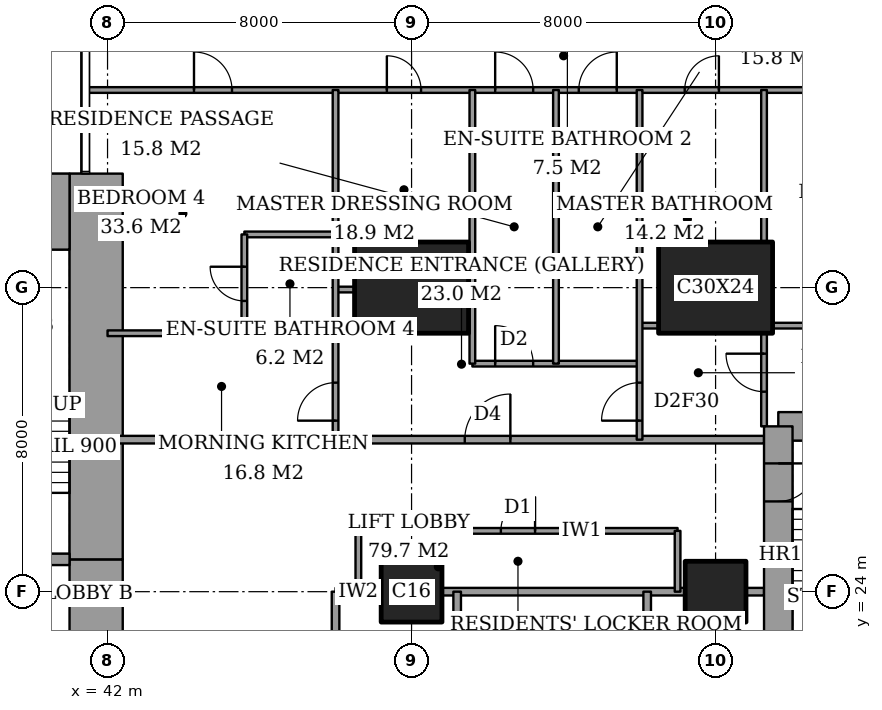
"""IFC4 building model, lengths in metres.
Left out: names, types, materials, properties, quantities, classifications, styles, units other than length and angle.
Written with IfcOpenShell. Run it as: python <this file> out.ifc"""

import sys

from ifc_helpers import new_model, si_unit, direction, frame, frame_2d, origin, origin_2d, place, context, subcontext, project, spatial, rectangle, extrude, element, fill, save


model = new_model("IFC4")
c1 = context("Model", 3, precision=1e-05, world=origin(), true_north=direction((0.0, 1.0)))
c2 = subcontext(c1, "Body", "Model", "MODEL_VIEW")
j1 = project(units=[si_unit("LENGTHUNIT", "METRE"), si_unit("PLANEANGLEUNIT", "RADIAN")], contexts=[c1])
p1 = place(None, origin())
s1 = spatial("IfcSite", under=j1, at=p1, CompositionType="ELEMENT")
p2 = place(p1, origin())
s2 = spatial("IfcBuilding", under=s1, at=p2, CompositionType="ELEMENT")
p3 = place(p2, frame((0.0, 0.0, 262.8)))
s3 = spatial("IfcBuildingStorey", under=s2, at=p3, CompositionType="ELEMENT", Elevation=262.8)
p4 = place(p3, frame((50.0, 24.0, 0.0), z_axis=(0.0, 0.0, 1.0), x_axis=(1.0, 0.0, 0.0)))
e1 = element("IfcColumn", 1, at=p4, inside=s3, PredefinedType="COLUMN", context=c2, shape_type="SweptSolid", body=[
    extrude(rectangle(XDim=1.6, YDim=1.6, at=origin_2d()), origin(), (0.0, 0.0, 1.0), 3.6),
])
p5 = place(p3, frame((50.0, 32.0, 0.0), z_axis=(0.0, 0.0, 1.0), x_axis=(1.0, 0.0, 0.0)))
e2 = element("IfcColumn", 2, at=p5, inside=s3, PredefinedType="COLUMN", context=c2, shape_type="SweptSolid", body=[
    extrude(rectangle(XDim=3.0, YDim=2.4, at=origin_2d()), origin(), (0.0, 0.0, 1.0), 3.6),
])
p6 = place(p3, frame((58.0, 24.0, 0.0), z_axis=(0.0, 0.0, 1.0), x_axis=(1.0, 0.0, 0.0)))
e3 = element("IfcColumn", 3, at=p6, inside=s3, PredefinedType="COLUMN", context=c2, shape_type="SweptSolid", body=[
    extrude(rectangle(XDim=1.6, YDim=1.6, at=origin_2d()), origin(), (0.0, 0.0, 1.0), 3.6),
])
p7 = place(p3, frame((58.0, 32.0, 0.0), z_axis=(0.0, 0.0, 1.0), x_axis=(1.0, 0.0, 0.0)))
e4 = element("IfcColumn", 4, at=p7, inside=s3, PredefinedType="COLUMN", context=c2, shape_type="SweptSolid", body=[
    extrude(rectangle(XDim=3.0, YDim=2.4, at=origin_2d()), origin(), (0.0, 0.0, 1.0), 3.6),
])
p8 = place(p3, frame((37.85, 34.0, 0.0), z_axis=(0.0, 0.0, 1.0), x_axis=(1.0, 0.0, 0.0)))
e5 = element("IfcWall", 5, at=p8, inside=s3, PredefinedType="SHEAR", context=c2, shape_type="SweptSolid", body=[
    extrude(rectangle(XDim=3.15, YDim=2.0, at=frame_2d((1.575, 0.0))), origin(), (0.0, 0.0, 1.0), 3.6),
])
p9 = place(p3, frame((41.7, 13.0, 0.0), z_axis=(0.0, 0.0, 1.0), x_axis=(0.0, 1.0, 0.0)))
e6 = element("IfcWall", 6, at=p9, inside=s3, PredefinedType="SHEAR", context=c2, shape_type="SweptSolid", body=[
    extrude(rectangle(XDim=11.85, YDim=1.4, at=frame_2d((5.925, 0.0))), origin(), (0.0, 0.0, 1.0), 3.6),
])
p10 = place(p9, frame((7.5, 0.0, 0.0)))
e7 = element("IfcOpeningElement", 7, at=p10, cuts=e6, PredefinedType="OPENING", context=c2, shape_type="SweptSolid", body=[
    extrude(rectangle(XDim=1.8, YDim=2.4, at=frame_2d((0.9, 1.2))), frame((0.0, 0.71, 0.0), z_axis=(0.0, -1.0, 0.0), x_axis=(1.0, 0.0, 0.0)), (0.0, 0.0, 1.0), 1.42),
])
p11 = place(p3, frame((41.7, 24.85, 0.0), z_axis=(0.0, 0.0, 1.0), x_axis=(0.0, 1.0, 0.0)))
e8 = element("IfcWall", 8, at=p11, inside=s3, PredefinedType="SHEAR", context=c2, shape_type="SweptSolid", body=[
    extrude(rectangle(XDim=10.15, YDim=1.4, at=frame_2d((5.075, 0.0))), origin(), (0.0, 0.0, 1.0), 3.6),
])
p12 = place(p3, frame((37.85, 24.85, 0.0), z_axis=(0.0, 0.0, 1.0), x_axis=(1.0, 0.0, 0.0)))
e9 = element("IfcWall", 9, at=p12, inside=s3, PredefinedType="SHEAR", context=c2, shape_type="SweptSolid", body=[
    extrude(rectangle(XDim=3.15, YDim=0.3, at=frame_2d((1.575, 0.0))), origin(), (0.0, 0.0, 1.0), 3.6),
])
p13 = place(p12, frame((0.95, 0.0, 0.0)))
e10 = element("IfcOpeningElement", 10, at=p13, cuts=e9, PredefinedType="OPENING", context=c2, shape_type="SweptSolid", body=[
    extrude(rectangle(XDim=1.0, YDim=2.1, at=frame_2d((0.5, 1.05))), frame((0.0, 0.16, 0.0), z_axis=(0.0, -1.0, 0.0), x_axis=(1.0, 0.0, 0.0)), (0.0, 0.0, 1.0), 0.32),
])
p14 = place(p3, frame((64.1, 28.35, 0.0), z_axis=(0.0, 0.0, 1.0), x_axis=(-1.0, 0.0, 0.0)))
e11 = element("IfcWall", 11, at=p14, inside=s3, PredefinedType="SHEAR", context=c2, shape_type="SweptSolid", body=[
    extrude(rectangle(XDim=4.45, YDim=0.75, at=frame_2d((2.225, 0.0))), origin(), (0.0, 0.0, 1.0), 3.6),
])
p15 = place(p3, frame((59.65, 28.35, 0.0), z_axis=(0.0, 0.0, 1.0), x_axis=(0.0, -1.0, 0.0)))
e12 = element("IfcWall", 12, at=p15, inside=s3, PredefinedType="SHEAR", context=c2, shape_type="SweptSolid", body=[
    extrude(rectangle(XDim=8.7, YDim=0.75, at=frame_2d((4.35, 0.0))), origin(), (0.0, 0.0, 1.0), 3.6),
])
p16 = place(p15, frame((0.975, 0.0, 0.0)))
e13 = element("IfcOpeningElement", 13, at=p16, cuts=e12, PredefinedType="OPENING", context=c2, shape_type="SweptSolid", body=[
    extrude(rectangle(XDim=1.0, YDim=2.1, at=frame_2d((0.5, 1.05))), frame((0.0, 0.385, 0.0), z_axis=(0.0, -1.0, 0.0), x_axis=(1.0, 0.0, 0.0)), (0.0, 0.0, 1.0), 0.77),
])
p17 = place(p3, frame((48.0, 24.0, 0.0), z_axis=(0.0, 0.0, 1.0), x_axis=(1.0, 0.0, 0.0)))
e14 = element("IfcWall", 14, at=p17, inside=s3, PredefinedType="PARTITIONING", context=c2, shape_type="SweptSolid", body=[
    extrude(rectangle(XDim=1.2, YDim=0.2, at=frame_2d((0.6, 0.0))), origin(), (0.0, 0.0, 1.0), 3.35),
])
p18 = place(p3, frame((50.8, 24.0, 0.0), z_axis=(0.0, 0.0, 1.0), x_axis=(1.0, 0.0, 0.0)))
e15 = element("IfcWall", 15, at=p18, inside=s3, PredefinedType="PARTITIONING", context=c2, shape_type="SweptSolid", body=[
    extrude(rectangle(XDim=6.4, YDim=0.2, at=frame_2d((3.2, 0.0))), origin(), (0.0, 0.0, 1.0), 3.35),
])
p19 = place(p3, frame((58.8, 24.0, 0.0), z_axis=(0.0, 0.0, 1.0), x_axis=(1.0, 0.0, 0.0)))
e16 = element("IfcWall", 16, at=p19, inside=s3, PredefinedType="PARTITIONING", context=c2, shape_type="SweptSolid", body=[
    extrude(rectangle(XDim=0.475, YDim=0.2, at=frame_2d((0.237, 0.0))), origin(), (0.0, 0.0, 1.0), 3.35),
])
p20 = place(p3, frame((48.6, 25.6, 0.0), z_axis=(0.0, 0.0, 1.0), x_axis=(1.0, 0.0, 0.0)))
e17 = element("IfcWall", 17, at=p20, inside=s3, PredefinedType="PARTITIONING", context=c2, shape_type="SweptSolid", body=[
    extrude(rectangle(XDim=8.4, YDim=0.15, at=frame_2d((4.2, 0.0))), origin(), (0.0, 0.0, 1.0), 3.35),
])
p21 = place(p20, frame((3.75, 0.0, 0.0)))
e18 = element("IfcOpeningElement", 18, at=p21, cuts=e17, PredefinedType="OPENING", context=c2, shape_type="SweptSolid", body=[
    extrude(rectangle(XDim=0.9, YDim=2.1, at=frame_2d((0.45, 1.05))), frame((0.0, 0.085, 0.0), z_axis=(0.0, -1.0, 0.0), x_axis=(1.0, 0.0, 0.0)), (0.0, 0.0, 1.0), 0.17),
])
p22 = place(p3, frame((42.0, 28.0, 0.0), z_axis=(0.0, 0.0, 1.0), x_axis=(1.0, 0.0, 0.0)))
e19 = element("IfcWall", 19, at=p22, inside=s3, PredefinedType="PARTITIONING", context=c2, shape_type="SweptSolid", body=[
    extrude(rectangle(XDim=17.275, YDim=0.2, at=frame_2d((8.637, 0.0))), origin(), (0.0, 0.0, 1.0), 3.35),
])
p23 = place(p22, frame((9.4, 0.0, 0.0)))
e20 = element("IfcOpeningElement", 20, at=p23, cuts=e19, PredefinedType="OPENING", context=c2, shape_type="SweptSolid", body=[
    extrude(rectangle(XDim=1.2, YDim=2.4, at=frame_2d((0.6, 1.2))), frame((0.0, 0.11, 0.0), z_axis=(0.0, -1.0, 0.0), x_axis=(1.0, 0.0, 0.0)), (0.0, 0.0, 1.0), 0.22),
])
p24 = place(p3, frame((51.6, 30.0, 0.0), z_axis=(0.0, 0.0, 1.0), x_axis=(1.0, 0.0, 0.0)))
e21 = element("IfcWall", 21, at=p24, inside=s3, PredefinedType="PARTITIONING", context=c2, shape_type="SweptSolid", body=[
    extrude(rectangle(XDim=4.4, YDim=0.15, at=frame_2d((2.2, 0.0))), origin(), (0.0, 0.0, 1.0), 3.35),
])
p25 = place(p24, frame((0.6, 0.0, 0.0)))
e22 = element("IfcOpeningElement", 22, at=p25, cuts=e21, PredefinedType="OPENING", context=c2, shape_type="SweptSolid", body=[
    extrude(rectangle(XDim=1.0, YDim=2.1, at=frame_2d((0.5, 1.05))), frame((0.0, 0.085, 0.0), z_axis=(0.0, -1.0, 0.0), x_axis=(1.0, 0.0, 0.0)), (0.0, 0.0, 1.0), 0.17),
])
p26 = place(p3, frame((42.0, 30.8, 0.0), z_axis=(0.0, 0.0, 1.0), x_axis=(1.0, 0.0, 0.0)))
e23 = element("IfcWall", 23, at=p26, inside=s3, PredefinedType="PARTITIONING", context=c2, shape_type="SweptSolid", body=[
    extrude(rectangle(XDim=6.0, YDim=0.15, at=frame_2d((3.0, 0.0))), origin(), (0.0, 0.0, 1.0), 3.35),
])
p27 = place(p3, frame((56.0, 31.0, 0.0), z_axis=(0.0, 0.0, 1.0), x_axis=(1.0, 0.0, 0.0)))
e24 = element("IfcWall", 24, at=p27, inside=s3, PredefinedType="PARTITIONING", context=c2, shape_type="SweptSolid", body=[
    extrude(rectangle(XDim=0.5, YDim=0.15, at=frame_2d((0.25, 0.0))), origin(), (0.0, 0.0, 1.0), 3.35),
])
p28 = place(p3, frame((59.5, 31.0, 0.0), z_axis=(0.0, 0.0, 1.0), x_axis=(1.0, 0.0, 0.0)))
e25 = element("IfcWall", 25, at=p28, inside=s3, PredefinedType="PARTITIONING", context=c2, shape_type="SweptSolid", body=[
    extrude(rectangle(XDim=6.95, YDim=0.15, at=frame_2d((3.475, 0.0))), origin(), (0.0, 0.0, 1.0), 3.35),
])
p29 = place(p3, frame((48.0, 31.95, 0.0), z_axis=(0.0, 0.0, 1.0), x_axis=(1.0, 0.0, 0.0)))
e26 = element("IfcWall", 26, at=p29, inside=s3, PredefinedType="PARTITIONING", context=c2, shape_type="SweptSolid", body=[
    extrude(rectangle(XDim=0.5, YDim=0.15, at=frame_2d((0.25, 0.0))), origin(), (0.0, 0.0, 1.0), 2.634),
])
p30 = place(p3, frame((45.6, 33.4, 0.0), z_axis=(0.0, 0.0, 1.0), x_axis=(1.0, 0.0, 0.0)))
e27 = element("IfcWall", 27, at=p30, inside=s3, PredefinedType="PARTITIONING", context=c2, shape_type="SweptSolid", body=[
    extrude(rectangle(XDim=2.4, YDim=0.15, at=frame_2d((1.2, 0.0))), origin(), (0.0, 0.0, 1.0), 3.35),
])
p31 = place(p3, frame((41.439, 37.2, 0.0), z_axis=(0.0, 0.0, 1.0), x_axis=(1.0, 0.0, 0.0)))
e28 = element("IfcWall", 28, at=p31, inside=s3, PredefinedType="PARTITIONING", context=c2, shape_type="SweptSolid", body=[
    extrude(rectangle(XDim=25.011, YDim=0.15, at=frame_2d((12.505, 0.0))), origin(), (0.0, 0.0, 1.0), 3.35),
])
p32 = place(p31, frame((10.761, 0.0, 0.0)))
e29 = element("IfcOpeningElement", 29, at=p32, cuts=e28, PredefinedType="OPENING", context=c2, shape_type="SweptSolid", body=[
    extrude(rectangle(XDim=1.0, YDim=2.1, at=frame_2d((0.5, 1.05))), frame((0.0, 0.085, 0.0), z_axis=(0.0, -1.0, 0.0), x_axis=(1.0, 0.0, 0.0)), (0.0, 0.0, 1.0), 0.17),
])
p33 = place(p31, frame((20.924, 0.0, 0.0)))
e30 = element("IfcOpeningElement", 30, at=p33, cuts=e28, PredefinedType="OPENING", context=c2, shape_type="SweptSolid", body=[
    extrude(rectangle(XDim=1.0, YDim=2.1, at=frame_2d((0.5, 1.05))), frame((0.0, 0.085, 0.0), z_axis=(0.0, -1.0, 0.0), x_axis=(1.0, 0.0, 0.0)), (0.0, 0.0, 1.0), 0.17),
])
p34 = place(p31, frame((15.749, 0.0, 0.0)))
e31 = element("IfcOpeningElement", 31, at=p34, cuts=e28, PredefinedType="OPENING", context=c2, shape_type="SweptSolid", body=[
    extrude(rectangle(XDim=0.9, YDim=2.1, at=frame_2d((0.45, 1.05))), frame((0.0, 0.085, 0.0), z_axis=(0.0, -1.0, 0.0), x_axis=(1.0, 0.0, 0.0)), (0.0, 0.0, 1.0), 0.17),
])
p35 = place(p31, frame((12.961, 0.0, 0.0)))
e32 = element("IfcOpeningElement", 32, at=p35, cuts=e28, PredefinedType="OPENING", context=c2, shape_type="SweptSolid", body=[
    extrude(rectangle(XDim=1.0, YDim=2.1, at=frame_2d((0.5, 1.05))), frame((0.0, 0.085, 0.0), z_axis=(0.0, -1.0, 0.0), x_axis=(1.0, 0.0, 0.0)), (0.0, 0.0, 1.0), 0.17),
])
p36 = place(p31, frame((7.911, 0.0, 0.0)))
e33 = element("IfcOpeningElement", 33, at=p36, cuts=e28, PredefinedType="OPENING", context=c2, shape_type="SweptSolid", body=[
    extrude(rectangle(XDim=0.9, YDim=2.1, at=frame_2d((0.45, 1.05))), frame((0.0, 0.085, 0.0), z_axis=(0.0, -1.0, 0.0), x_axis=(1.0, 0.0, 0.0)), (0.0, 0.0, 1.0), 0.17),
])
p37 = place(p31, frame((2.836, 0.0, 0.0)))
e34 = element("IfcOpeningElement", 34, at=p37, cuts=e28, PredefinedType="OPENING", context=c2, shape_type="SweptSolid", body=[
    extrude(rectangle(XDim=1.0, YDim=2.1, at=frame_2d((0.5, 1.05))), frame((0.0, 0.085, 0.0), z_axis=(0.0, -1.0, 0.0), x_axis=(1.0, 0.0, 0.0)), (0.0, 0.0, 1.0), 0.17),
])
p38 = place(p3, frame((45.6, 30.8, 0.0), z_axis=(0.0, 0.0, 1.0), x_axis=(0.0, 1.0, 0.0)))
e35 = element("IfcWall", 35, at=p38, inside=s3, PredefinedType="PARTITIONING", context=c2, shape_type="SweptSolid", body=[
    extrude(rectangle(XDim=2.6, YDim=0.15, at=frame_2d((1.3, 0.0))), origin(), (0.0, 0.0, 1.0), 3.35),
])
p39 = place(p38, frame((0.85, 0.0, 0.0)))
e36 = element("IfcOpeningElement", 36, at=p39, cuts=e35, PredefinedType="OPENING", context=c2, shape_type="SweptSolid", body=[
    extrude(rectangle(XDim=0.9, YDim=2.1, at=frame_2d((0.45, 1.05))), frame((0.0, 0.085, 0.0), z_axis=(0.0, -1.0, 0.0), x_axis=(1.0, 0.0, 0.0)), (0.0, 0.0, 1.0), 0.17),
])
p40 = place(p3, frame((48.0, 16.5, 0.0), z_axis=(0.0, 0.0, 1.0), x_axis=(0.0, 1.0, 0.0)))
e37 = element("IfcWall", 37, at=p40, inside=s3, PredefinedType="PARTITIONING", context=c2, shape_type="SweptSolid", body=[
    extrude(rectangle(XDim=7.5, YDim=0.2, at=frame_2d((3.75, 0.0))), origin(), (0.0, 0.0, 1.0), 3.35),
])
p41 = place(p40, frame((4.9, 0.0, 0.0)))
e38 = element("IfcOpeningElement", 38, at=p41, cuts=e37, PredefinedType="OPENING", context=c2, shape_type="SweptSolid", body=[
    extrude(rectangle(XDim=1.2, YDim=2.4, at=frame_2d((0.6, 1.2))), frame((0.0, 0.11, 0.0), z_axis=(0.0, -1.0, 0.0), x_axis=(1.0, 0.0, 0.0)), (0.0, 0.0, 1.0), 0.22),
])
p42 = place(p40, frame((1.3, 0.0, 0.0)))
e39 = element("IfcOpeningElement", 39, at=p42, cuts=e37, PredefinedType="OPENING", context=c2, shape_type="SweptSolid", body=[
    extrude(rectangle(XDim=0.9, YDim=2.1, at=frame_2d((0.45, 1.05))), frame((0.0, 0.11, 0.0), z_axis=(0.0, -1.0, 0.0), x_axis=(1.0, 0.0, 0.0)), (0.0, 0.0, 1.0), 0.22),
])
p43 = place(p3, frame((48.0, 28.0, 0.0), z_axis=(0.0, 0.0, 1.0), x_axis=(0.0, 1.0, 0.0)))
e40 = element("IfcWall", 40, at=p43, inside=s3, PredefinedType="PARTITIONING", context=c2, shape_type="SweptSolid", body=[
    extrude(rectangle(XDim=9.2, YDim=0.15, at=frame_2d((4.6, 0.0))), origin(), (0.0, 0.0, 1.0), 3.35),
])
p44 = place(p43, frame((0.5, 0.0, 0.0)))
e41 = element("IfcOpeningElement", 41, at=p44, cuts=e40, PredefinedType="OPENING", context=c2, shape_type="SweptSolid", body=[
    extrude(rectangle(XDim=1.0, YDim=2.1, at=frame_2d((0.5, 1.05))), frame((0.0, 0.085, 0.0), z_axis=(0.0, -1.0, 0.0), x_axis=(1.0, 0.0, 0.0)), (0.0, 0.0, 1.0), 0.17),
])
p45 = place(p3, frame((48.6, 24.0, 0.0), z_axis=(0.0, 0.0, 1.0), x_axis=(0.0, 1.0, 0.0)))
e42 = element("IfcWall", 42, at=p45, inside=s3, PredefinedType="PARTITIONING", context=c2, shape_type="SweptSolid", body=[
    extrude(rectangle(XDim=1.6, YDim=0.15, at=frame_2d((0.8, 0.0))), origin(), (0.0, 0.0, 1.0), 3.35),
])
p46 = place(p3, frame((51.2, 21.6, 0.0), z_axis=(0.0, 0.0, 1.0), x_axis=(0.0, 1.0, 0.0)))
e43 = element("IfcWall", 43, at=p46, inside=s3, PredefinedType="PARTITIONING", context=c2, shape_type="SweptSolid", body=[
    extrude(rectangle(XDim=2.4, YDim=0.2, at=frame_2d((1.2, 0.0))), origin(), (0.0, 0.0, 1.0), 3.35),
])
for number, where, z_axis, x_axis in (
    (44, (51.6, 30.0, 0.0), (0.0, 0.0, 1.0), (0.0, 1.0, 0.0)),
    (45, (53.8, 30.0, 0.0), (0.0, 0.0, 1.0), (0.0, 1.0, 0.0)),
):
    element("IfcWall", number, at=place(p3, frame(where, z_axis=z_axis, x_axis=x_axis)), inside=s3, PredefinedType="PARTITIONING", context=c2, shape_type="SweptSolid", body=[
        extrude(rectangle(XDim=7.2, YDim=0.15, at=frame_2d((3.6, 0.0))), origin(), (0.0, 0.0, 1.0), 3.35),
    ])
p47 = place(p3, frame((56.0, 28.0, 0.0), z_axis=(0.0, 0.0, 1.0), x_axis=(0.0, 1.0, 0.0)))
e46 = element("IfcWall", 46, at=p47, inside=s3, PredefinedType="PARTITIONING", context=c2, shape_type="SweptSolid", body=[
    extrude(rectangle(XDim=9.2, YDim=0.15, at=frame_2d((4.6, 0.0))), origin(), (0.0, 0.0, 1.0), 3.35),
])
p48 = place(p47, frame((0.5, 0.0, 0.0)))
e47 = element("IfcOpeningElement", 47, at=p48, cuts=e46, PredefinedType="OPENING", context=c2, shape_type="SweptSolid", body=[
    extrude(rectangle(XDim=1.0, YDim=2.1, at=frame_2d((0.5, 1.05))), frame((0.0, 0.085, 0.0), z_axis=(0.0, -1.0, 0.0), x_axis=(1.0, 0.0, 0.0)), (0.0, 0.0, 1.0), 0.17),
])
p49 = place(p3, frame((56.2, 21.6, 0.0), z_axis=(0.0, 0.0, 1.0), x_axis=(0.0, 1.0, 0.0)))
e48 = element("IfcWall", 48, at=p49, inside=s3, PredefinedType="PARTITIONING", context=c2, shape_type="SweptSolid", body=[
    extrude(rectangle(XDim=2.4, YDim=0.2, at=frame_2d((1.2, 0.0))), origin(), (0.0, 0.0, 1.0), 3.35),
])
p50 = place(p3, frame((57.0, 24.0, 0.0), z_axis=(0.0, 0.0, 1.0), x_axis=(0.0, 1.0, 0.0)))
e49 = element("IfcWall", 49, at=p50, inside=s3, PredefinedType="PARTITIONING", context=c2, shape_type="SweptSolid", body=[
    extrude(rectangle(XDim=1.6, YDim=0.15, at=frame_2d((0.8, 0.0))), origin(), (0.0, 0.0, 1.0), 3.35),
])
p51 = place(p3, frame((59.275, 28.35, 0.0), z_axis=(0.0, 0.0, 1.0), x_axis=(0.0, 1.0, 0.0)))
e50 = element("IfcWall", 50, at=p51, inside=s3, PredefinedType="PARTITIONING", context=c2, shape_type="SweptSolid", body=[
    extrude(rectangle(XDim=2.45, YDim=0.15, at=frame_2d((1.225, 0.0))), origin(), (0.0, 0.0, 1.0), 3.35),
])
p52 = place(p51, frame((0.913, 0.0, 0.0)))
e51 = element("IfcOpeningElement", 51, at=p52, cuts=e50, PredefinedType="OPENING", context=c2, shape_type="SweptSolid", body=[
    extrude(rectangle(XDim=1.0, YDim=2.1, at=frame_2d((0.5, 1.05))), frame((0.0, 0.085, 0.0), z_axis=(0.0, -1.0, 0.0), x_axis=(1.0, 0.0, 0.0)), (0.0, 0.0, 1.0), 0.17),
])
p53 = place(p3, frame((59.275, 33.2, 0.0), z_axis=(0.0, 0.0, 1.0), x_axis=(0.0, 1.0, 0.0)))
e52 = element("IfcWall", 52, at=p53, inside=s3, PredefinedType="PARTITIONING", context=c2, shape_type="SweptSolid", body=[
    extrude(rectangle(XDim=4.0, YDim=0.15, at=frame_2d((2.0, 0.0))), origin(), (0.0, 0.0, 1.0), 3.35),
])
p54 = place(p32, origin())
e53 = element("IfcDoor", 53, at=p54, inside=s3, OperationType="SINGLE_SWING_RIGHT", PredefinedType="DOOR", context=c2, shape_type="SweptSolid", body=[
    extrude(rectangle(XDim=1.0, YDim=2.1, at=frame_2d((0.5, 1.05))), frame((0.0, 0.025, 0.0), z_axis=(0.0, -1.0, 0.0), x_axis=(1.0, 0.0, 0.0)), (0.0, 0.0, 1.0), 0.05),
])
fill(e29, e53)
p55 = place(p52, origin())
e54 = element("IfcDoor", 54, at=p55, inside=s3, OperationType="SINGLE_SWING_LEFT", PredefinedType="DOOR", context=c2, shape_type="SweptSolid", body=[
    extrude(rectangle(XDim=1.0, YDim=2.1, at=frame_2d((0.5, 1.05))), frame((0.0, 0.025, 0.0), z_axis=(0.0, -1.0, 0.0), x_axis=(1.0, 0.0, 0.0)), (0.0, 0.0, 1.0), 0.05),
])
fill(e51, e54)
p56 = place(p34, origin())
e55 = element("IfcDoor", 55, at=p56, inside=s3, OperationType="SINGLE_SWING_LEFT", PredefinedType="DOOR", context=c2, shape_type="SweptSolid", body=[
    extrude(rectangle(XDim=0.9, YDim=2.1, at=frame_2d((0.45, 1.05))), frame((0.0, 0.025, 0.0), z_axis=(0.0, -1.0, 0.0), x_axis=(1.0, 0.0, 0.0)), (0.0, 0.0, 1.0), 0.05),
])
fill(e31, e55)
p57 = place(p48, origin())
e56 = element("IfcDoor", 56, at=p57, inside=s3, OperationType="SINGLE_SWING_RIGHT", PredefinedType="DOOR", context=c2, shape_type="SweptSolid", body=[
    extrude(rectangle(XDim=1.0, YDim=2.1, at=frame_2d((0.5, 1.05))), frame((0.0, 0.025, 0.0), z_axis=(0.0, -1.0, 0.0), x_axis=(1.0, 0.0, 0.0)), (0.0, 0.0, 1.0), 0.05),
])
fill(e47, e56)
p58 = place(p23, origin())
e57 = element("IfcDoor", 57, at=p58, inside=s3, OperationType="SINGLE_SWING_LEFT", PredefinedType="DOOR", context=c2, shape_type="SweptSolid", body=[
    extrude(rectangle(XDim=1.2, YDim=2.4, at=frame_2d((0.6, 1.2))), frame((0.0, 0.025, 0.0), z_axis=(0.0, -1.0, 0.0), x_axis=(1.0, 0.0, 0.0)), (0.0, 0.0, 1.0), 0.05),
])
fill(e20, e57)
p59 = place(p35, origin())
e58 = element("IfcDoor", 58, at=p59, inside=s3, OperationType="SINGLE_SWING_LEFT", PredefinedType="DOOR", context=c2, shape_type="SweptSolid", body=[
    extrude(rectangle(XDim=1.0, YDim=2.1, at=frame_2d((0.5, 1.05))), frame((0.0, 0.025, 0.0), z_axis=(0.0, -1.0, 0.0), x_axis=(1.0, 0.0, 0.0)), (0.0, 0.0, 1.0), 0.05),
])
fill(e32, e58)
p60 = place(p25, origin())
e59 = element("IfcDoor", 59, at=p60, inside=s3, OperationType="SINGLE_SWING_RIGHT", PredefinedType="DOOR", context=c2, shape_type="SweptSolid", body=[
    extrude(rectangle(XDim=1.0, YDim=2.1, at=frame_2d((0.5, 1.05))), frame((0.0, 0.025, 0.0), z_axis=(0.0, -1.0, 0.0), x_axis=(1.0, 0.0, 0.0)), (0.0, 0.0, 1.0), 0.05),
])
fill(e22, e59)
p61 = place(p36, origin())
e60 = element("IfcDoor", 60, at=p61, inside=s3, OperationType="SINGLE_SWING_RIGHT", PredefinedType="DOOR", context=c2, shape_type="SweptSolid", body=[
    extrude(rectangle(XDim=0.9, YDim=2.1, at=frame_2d((0.45, 1.05))), frame((0.0, 0.025, 0.0), z_axis=(0.0, -1.0, 0.0), x_axis=(1.0, 0.0, 0.0)), (0.0, 0.0, 1.0), 0.05),
])
fill(e33, e60)
p62 = place(p39, origin())
e61 = element("IfcDoor", 61, at=p62, inside=s3, OperationType="SINGLE_SWING_LEFT", PredefinedType="DOOR", context=c2, shape_type="SweptSolid", body=[
    extrude(rectangle(XDim=0.9, YDim=2.1, at=frame_2d((0.45, 1.05))), frame((0.0, 0.025, 0.0), z_axis=(0.0, -1.0, 0.0), x_axis=(1.0, 0.0, 0.0)), (0.0, 0.0, 1.0), 0.05),
])
fill(e36, e61)
p63 = place(p37, origin())
e62 = element("IfcDoor", 62, at=p63, inside=s3, OperationType="SINGLE_SWING_RIGHT", PredefinedType="DOOR", context=c2, shape_type="SweptSolid", body=[
    extrude(rectangle(XDim=1.0, YDim=2.1, at=frame_2d((0.5, 1.05))), frame((0.0, 0.025, 0.0), z_axis=(0.0, -1.0, 0.0), x_axis=(1.0, 0.0, 0.0)), (0.0, 0.0, 1.0), 0.05),
])
fill(e34, e62)
p64 = place(p44, origin())
e63 = element("IfcDoor", 63, at=p64, inside=s3, OperationType="SINGLE_SWING_RIGHT", PredefinedType="DOOR", context=c2, shape_type="SweptSolid", body=[
    extrude(rectangle(XDim=1.0, YDim=2.1, at=frame_2d((0.5, 1.05))), frame((0.0, 0.025, 0.0), z_axis=(0.0, -1.0, 0.0), x_axis=(1.0, 0.0, 0.0)), (0.0, 0.0, 1.0), 0.05),
])
fill(e41, e63)
p65 = place(p21, origin())
e64 = element("IfcDoor", 64, at=p65, inside=s3, OperationType="SINGLE_SWING_LEFT", PredefinedType="DOOR", context=c2, shape_type="SweptSolid", body=[
    extrude(rectangle(XDim=0.9, YDim=2.1, at=frame_2d((0.45, 1.05))), frame((0.0, 0.025, 0.0), z_axis=(0.0, -1.0, 0.0), x_axis=(1.0, 0.0, 0.0)), (0.0, 0.0, 1.0), 0.05),
])
fill(e18, e64)
p66 = place(p16, origin())
e65 = element("IfcDoor", 65, at=p66, inside=s3, OperationType="SINGLE_SWING_RIGHT", PredefinedType="DOOR", context=c2, shape_type="SweptSolid", body=[
    extrude(rectangle(XDim=1.0, YDim=2.1, at=frame_2d((0.5, 1.05))), frame((0.0, 0.025, 0.0), z_axis=(0.0, -1.0, 0.0), x_axis=(1.0, 0.0, 0.0)), (0.0, 0.0, 1.0), 0.05),
])
fill(e13, e65)
save(model, sys.argv[1])
